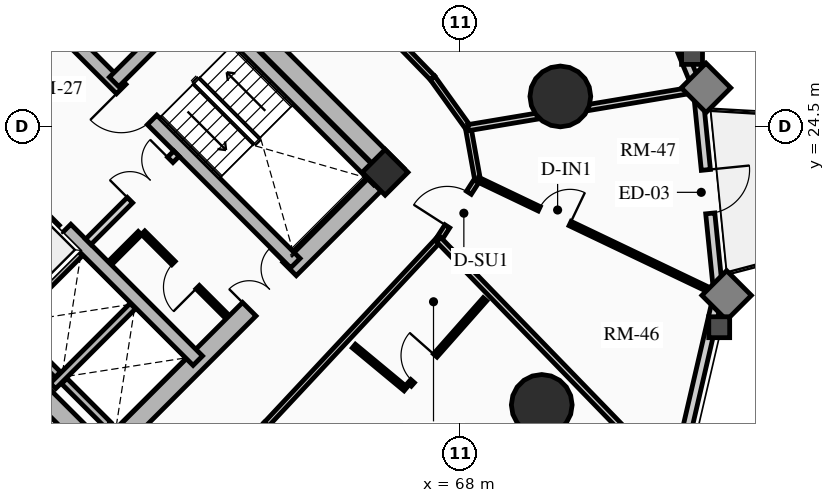
"""IFC4 building model, lengths in metres.
Left out: names, types, materials, properties, quantities, classifications, styles, units other than length and angle.
Written with IfcOpenShell. Run it as: python <this file> out.ifc"""

import sys

from ifc_helpers import new_model, si_unit, direction, frame, frame_2d, origin, origin_2d, place, context, subcontext, project, spatial, rectangle, circle, extrude, source, transform, mapped, element, fill, save


model = new_model("IFC4")
c1 = context("Model", 3, precision=1e-05, world=origin(), true_north=direction((0.0, 1.0)))
c2 = subcontext(c1, "Body", "Model", "MODEL_VIEW")
j1 = project(units=[si_unit("LENGTHUNIT", "METRE"), si_unit("PLANEANGLEUNIT", "RADIAN")], contexts=[c1])
p1 = place(None, origin())
s1 = spatial("IfcSite", under=j1, at=p1, CompositionType="ELEMENT")
p2 = place(p1, origin())
s2 = spatial("IfcBuilding", under=s1, at=p2, CompositionType="ELEMENT")
p3 = place(p2, frame((0.0, 0.0, 30.73)))
s3 = spatial("IfcBuildingStorey", under=s2, at=p3, CompositionType="ELEMENT", Elevation=30.73)
for number, where, z_axis, x_axis in (
    (1, (58.773, 15.661, 0.0), (0.0, 0.0, 1.0), (-0.707, 0.707, 0.0)),
    (2, (66.339, 23.227, 0.0), (0.0, 0.0, 1.0), (-0.707, 0.707, 0.0)),
):
    element("IfcWall", number, at=place(p3, frame(where, z_axis=z_axis, x_axis=x_axis)), inside=s3, PredefinedType="SHEAR", context=c2, shape_type="SweptSolid", body=[
        extrude(rectangle(XDim=14.3, YDim=0.5, at=frame_2d((7.15, 0.0))), origin(), (0.0, 0.0, 1.0), 2.91),
    ])
p4 = place(p3, frame((58.596, 15.838, 0.0), z_axis=(0.0, 0.0, 1.0), x_axis=(0.707106781187, 0.707106781187, 0.0)))
e3 = element("IfcWall", 3, at=p4, inside=s3, PredefinedType="SHEAR", context=c2, shape_type="SweptSolid", body=[
    extrude(rectangle(XDim=10.7, YDim=0.5, at=frame_2d((5.35, 0.0))), origin(), (0.0, 0.0, 1.0), 2.91),
])
m1 = source(origin(), c2, "Body", "SweptSolid", [
    extrude(rectangle(XDim=1.5, YDim=2.02, at=frame_2d((0.75, 1.01))), frame((0.0, 0.26, 0.0), z_axis=(0.0, -1.0, 0.0), x_axis=(1.0, 0.0, 0.0)), (0.0, 0.0, 1.0), 0.52),
])
p5 = place(p4, frame((5.45, 0.0, 0.0)))
e4 = element("IfcOpeningElement", 4, at=p5, cuts=e3, PredefinedType="OPENING", context=c2, shape_type="MappedRepresentation", body=[
    mapped(m1, transform((0.0, 0.0, 0.0), x_axis=(1.0, 0.0, 0.0), y_axis=(0.0, 1.0, 0.0), z_axis=(0.0, 0.0, 1.0), scale=1.0)),
])
p6 = place(p3, frame((61.096, 18.338, 0.0), z_axis=(0.0, 0.0, 1.0), x_axis=(-0.707106781187, 0.707106781187, 0.0)))
e5 = element("IfcWall", 5, at=p6, inside=s3, PredefinedType="SHEAR", context=c2, shape_type="SweptSolid", body=[
    extrude(rectangle(XDim=13.8, YDim=0.35, at=frame_2d((6.9, 0.0))), origin(), (0.0, 0.0, 1.0), 2.91),
])
m2 = source(origin(), c2, "Body", "SweptSolid", [
    extrude(rectangle(XDim=1.1, YDim=2.015, at=frame_2d((0.55, 1.007))), frame((0.0, 0.185, 0.0), z_axis=(0.0, -1.0, 0.0), x_axis=(1.0, 0.0, 0.0)), (0.0, 0.0, 1.0), 0.37),
])
p7 = place(p6, frame((4.9, 0.0, 0.0)))
e6 = element("IfcOpeningElement", 6, at=p7, cuts=e5, PredefinedType="OPENING", context=c2, shape_type="MappedRepresentation", body=[
    mapped(m2, transform((0.0, 0.0, 0.0), x_axis=(1.0, 0.0, 0.0), y_axis=(0.0, 1.0, 0.0), z_axis=(0.0, 0.0, 1.0), scale=1.0)),
])
m3 = source(origin(), c2, "Body", "SweptSolid", [
    extrude(rectangle(XDim=1.15, YDim=2.02, at=frame_2d((0.575, 1.01))), frame((0.0, 0.185, 0.0), z_axis=(0.0, -1.0, 0.0), x_axis=(1.0, 0.0, 0.0)), (0.0, 0.0, 1.0), 0.37),
])
p8 = place(p6, frame((7.32, 0.0, 0.0)))
e7 = element("IfcOpeningElement", 7, at=p8, cuts=e5, PredefinedType="OPENING", context=c2, shape_type="MappedRepresentation", body=[
    mapped(m3, transform((0.0, 0.0, 0.0), x_axis=(1.0, 0.0, 0.0), y_axis=(0.0, 1.0, 0.0), z_axis=(0.0, 0.0, 1.0), scale=1.0)),
])
p9 = place(p3, frame((63.662, 20.904, 0.0), z_axis=(0.0, 0.0, 1.0), x_axis=(-0.707106781187, 0.707106781187, 0.0)))
e8 = element("IfcWall", 8, at=p9, inside=s3, PredefinedType="SHEAR", context=c2, shape_type="SweptSolid", body=[
    extrude(rectangle(XDim=13.8, YDim=0.35, at=frame_2d((6.9, 0.0))), origin(), (0.0, 0.0, 1.0), 2.91),
])
p10 = place(p9, frame((10.025, 0.0, 0.0)))
e9 = element("IfcOpeningElement", 9, at=p10, cuts=e8, PredefinedType="OPENING", context=c2, shape_type="MappedRepresentation", body=[
    mapped(m2, transform((0.0, 0.0, 0.0), x_axis=(1.0, 0.0, 0.0), y_axis=(0.0, 1.0, 0.0), z_axis=(0.0, 0.0, 1.0), scale=1.0)),
])
p11 = place(p9, frame((12.025, 0.0, 0.0)))
e10 = element("IfcOpeningElement", 10, at=p11, cuts=e8, PredefinedType="OPENING", context=c2, shape_type="MappedRepresentation", body=[
    mapped(m2, transform((0.0, 0.0, 0.0), x_axis=(1.0, 0.0, 0.0), y_axis=(0.0, 1.0, 0.0), z_axis=(0.0, 0.0, 1.0), scale=1.0)),
])
p12 = place(p9, frame((5.33, 0.0, 0.0)))
e11 = element("IfcOpeningElement", 11, at=p12, cuts=e8, PredefinedType="OPENING", context=c2, shape_type="MappedRepresentation", body=[
    mapped(m3, transform((0.0, 0.0, 0.0), x_axis=(1.0, 0.0, 0.0), y_axis=(0.0, 1.0, 0.0), z_axis=(0.0, 0.0, 1.0), scale=1.0)),
])
p13 = place(p3, frame((65.847, 23.089, 0.0), z_axis=(0.0, 0.0, 1.0), x_axis=(-0.707106781187, 0.707106781187, 0.0)))
e12 = element("IfcWall", 12, at=p13, inside=s3, PredefinedType="SHEAR", context=c2, shape_type="SweptSolid", body=[
    extrude(rectangle(XDim=6.745, YDim=0.35, at=frame_2d((3.373, 0.0))), origin(), (0.0, 0.0, 1.0), 2.91),
])
p14 = place(p3, frame((58.893, 25.674, 0.0), z_axis=(0.0, 0.0, 1.0), x_axis=(0.707106781187, 0.707106781187, 0.0)))
e13 = element("IfcWall", 13, at=p14, inside=s3, PredefinedType="SHEAR", context=c2, shape_type="SweptSolid", body=[
    extrude(rectangle(XDim=3.285, YDim=0.35, at=frame_2d((1.643, 0.0))), origin(), (0.0, 0.0, 1.0), 2.91),
])
p15 = place(p3, frame((66.024, 23.294, 0.0), z_axis=(0.0, 0.0, 1.0), x_axis=(0.707106781187, 0.707106781187, 0.0)))
e14 = element("IfcColumn", 14, at=p15, inside=s3, PredefinedType="COLUMN", context=c2, shape_type="SweptSolid", body=[
    extrude(rectangle(XDim=0.85, YDim=0.85, at=origin_2d()), origin(), (0.0, 0.0, 1.0), 2.91),
])
for number, where, z_axis, x_axis in (
    (15, (70.146, 17.173, 0.0), (0.0, 0.0, 1.0), (1.0, 0.0, 0.0)),
    (16, (70.635, 25.291, 0.0), (0.0, 0.0, 1.0), (1.0, 0.0, 0.0)),
):
    element("IfcColumn", number, at=place(p3, frame(where, z_axis=z_axis, x_axis=x_axis)), inside=s3, PredefinedType="USERDEFINED", context=c2, shape_type="SweptSolid", body=[
        extrude(circle(Radius=0.8, at=origin_2d()), origin(), (0.0, 0.0, 1.0), 2.91),
    ])
p16 = place(p3, frame((74.794, 20.09, 0.0), z_axis=(0.0, 0.0, 1.0), x_axis=(-0.22582585901, -0.974167686491, 0.0)))
e17 = element("IfcWall", 17, at=p16, inside=s3, PredefinedType="SOLIDWALL", context=c2, shape_type="SweptSolid", body=[
    extrude(rectangle(XDim=5.092, YDim=0.24, at=frame_2d((2.546, 0.0))), origin(), (0.0, 0.0, 1.0), 2.073),
])
p17 = place(p3, frame((74.251, 25.482, 0.0), z_axis=(0.0, 0.0, 1.0), x_axis=(0.100190592135, -0.994968263437, 0.0)))
e18 = element("IfcWall", 18, at=p17, inside=s3, PredefinedType="SOLIDWALL", context=c2, shape_type="SweptSolid", body=[
    extrude(rectangle(XDim=5.419, YDim=0.24, at=frame_2d((2.71, 0.0))), origin(), (0.0, 0.0, 1.0), 2.073),
])
m4 = source(origin(), c2, "Body", "SweptSolid", [
    extrude(rectangle(XDim=1.15, YDim=2.005, at=frame_2d((0.575, 1.002))), frame((0.0, 0.13, 0.0), z_axis=(0.0, -1.0, 0.0), x_axis=(1.0, 0.0, 0.0)), (0.0, 0.0, 1.0), 0.26),
])
p18 = place(p17, frame((2.135, 0.0, 0.0)))
e19 = element("IfcOpeningElement", 19, at=p18, cuts=e18, PredefinedType="OPENING", context=c2, shape_type="MappedRepresentation", body=[
    mapped(m4, transform((0.0, 0.0, 0.0), x_axis=(1.0, 0.0, 0.0), y_axis=(0.0, 1.0, 0.0), z_axis=(0.0, 0.0, 1.0), scale=1.0)),
])
p19 = place(p3, frame((72.068, 30.778, 0.0), z_axis=(0.0, 0.0, 1.0), x_axis=(0.381077764176, -0.924542988536, 0.0)))
e20 = element("IfcWall", 20, at=p19, inside=s3, PredefinedType="SOLIDWALL", context=c2, shape_type="SweptSolid", body=[
    extrude(rectangle(XDim=5.728, YDim=0.24, at=frame_2d((2.864, 0.0))), origin(), (0.0, 0.0, 1.0), 2.073),
])
p20 = place(p3, frame((55.888, 19.069, 0.0), z_axis=(0.0, 0.0, 1.0), x_axis=(0.707106781187, 0.707106781187, 0.0)))
e21 = element("IfcWall", 21, at=p20, inside=s3, PredefinedType="SHEAR", context=c2, shape_type="SweptSolid", body=[
    extrude(rectangle(XDim=2.97, YDim=0.2, at=frame_2d((1.485, 0.0))), origin(), (0.0, 0.0, 1.0), 2.91),
])
p21 = place(p3, frame((57.284, 17.673, 0.0), z_axis=(0.0, 0.0, 1.0), x_axis=(0.707147878904, 0.70706568108, 0.0)))
e22 = element("IfcWall", 22, at=p21, inside=s3, PredefinedType="SHEAR", context=c2, shape_type="SweptSolid", body=[
    extrude(rectangle(XDim=2.97, YDim=0.2, at=frame_2d((1.485, 0.0))), origin(), (0.0, 0.0, 1.0), 2.91),
])
p22 = place(p3, frame((57.412, 17.97, 0.0), z_axis=(0.0, 0.0, 1.0), x_axis=(-0.707106781187, 0.707106781187, 0.0)))
e23 = element("IfcWall", 23, at=p22, inside=s3, PredefinedType="SHEAR", context=c2, shape_type="SweptSolid", body=[
    extrude(rectangle(XDim=1.735, YDim=0.2, at=frame_2d((0.867, 0.0))), origin(), (0.0, 0.0, 1.0), 2.91),
])
p23 = place(p3, frame((58.737, 16.644, 0.0), z_axis=(0.0, 0.0, 1.0), x_axis=(-0.707032117043, 0.707181437447, 0.0)))
e24 = element("IfcWall", 24, at=p23, inside=s3, PredefinedType="SHEAR", context=c2, shape_type="SweptSolid", body=[
    extrude(rectangle(XDim=1.635, YDim=0.2, at=frame_2d((0.817, 0.0))), origin(), (0.0, 0.0, 1.0), 2.91),
])
p24 = place(p3, frame((58.214, 21.467, 0.0), z_axis=(0.0, 0.0, 1.0), x_axis=(0.707106781187, 0.707106781187, 0.0)))
e25 = element("IfcWall", 25, at=p24, inside=s3, PredefinedType="PARTITIONING", context=c2, shape_type="SweptSolid", body=[
    extrude(rectangle(XDim=3.28, YDim=0.2, at=frame_2d((1.64, 0.0))), origin(), (0.0, 0.0, 1.0), 2.635),
])
m5 = source(origin(), c2, "Body", "SweptSolid", [
    extrude(rectangle(XDim=1.5, YDim=2.02, at=frame_2d((0.75, 1.01))), frame((0.0, 0.11, 0.0), z_axis=(0.0, -1.0, 0.0), x_axis=(1.0, 0.0, 0.0)), (0.0, 0.0, 1.0), 0.22),
])
p25 = place(p24, frame((1.55, 0.0, 0.0)))
e26 = element("IfcOpeningElement", 26, at=p25, cuts=e25, PredefinedType="OPENING", context=c2, shape_type="MappedRepresentation", body=[
    mapped(m5, transform((0.0, 0.0, 0.0), x_axis=(1.0, 0.0, 0.0), y_axis=(0.0, 1.0, 0.0), z_axis=(0.0, 0.0, 1.0), scale=1.0)),
])
p26 = place(p3, frame((54.961, 24.719, 0.0), z_axis=(0.0, 0.0, 1.0), x_axis=(0.707106781187, 0.707106781187, 0.0)))
e27 = element("IfcWall", 27, at=p26, inside=s3, PredefinedType="PARTITIONING", context=c2, shape_type="SweptSolid", body=[
    extrude(rectangle(XDim=3.28, YDim=0.2, at=frame_2d((1.64, 0.0))), origin(), (0.0, 0.0, 1.0), 2.635),
])
m6 = source(origin(), c2, "Body", "SweptSolid", [
    extrude(rectangle(XDim=0.9, YDim=2.005, at=frame_2d((0.45, 1.002))), frame((0.0, 0.11, 0.0), z_axis=(0.0, -1.0, 0.0), x_axis=(1.0, 0.0, 0.0)), (0.0, 0.0, 1.0), 0.22),
])
p27 = place(p26, frame((0.16, 0.0, 0.0)))
e28 = element("IfcOpeningElement", 28, at=p27, cuts=e27, PredefinedType="OPENING", context=c2, shape_type="MappedRepresentation", body=[
    mapped(m6, transform((0.0, 0.0, 0.0), x_axis=(1.0, 0.0, 0.0), y_axis=(0.0, 1.0, 0.0), z_axis=(0.0, 0.0, 1.0), scale=1.0)),
])
p28 = place(p3, frame((61.835, 19.529, 0.0), z_axis=(0.0, 0.0, 1.0), x_axis=(-0.707146413884, 0.707067146267, 0.0)))
e29 = element("IfcWall", 29, at=p28, inside=s3, PredefinedType="PARTITIONING", context=c2, shape_type="SweptSolid", body=[
    extrude(rectangle(XDim=3.08, YDim=0.125, at=frame_2d((1.54, 0.0))), origin(), (0.0, 0.0, 1.0), 2.635),
])
m7 = source(origin(), c2, "Body", "SweptSolid", [
    extrude(rectangle(XDim=0.9, YDim=2.005, at=frame_2d((0.45, 1.002))), frame((0.0, 0.073, 0.0), z_axis=(0.0, -1.0, 0.0), x_axis=(1.0, 0.0, 0.0)), (0.0, 0.0, 1.0), 0.145),
])
p29 = place(p28, frame((1.05, 0.0, 0.0)))
e30 = element("IfcOpeningElement", 30, at=p29, cuts=e29, PredefinedType="OPENING", context=c2, shape_type="MappedRepresentation", body=[
    mapped(m7, transform((0.0, 0.0, 0.0), x_axis=(1.0, 0.0, 0.0), y_axis=(0.0, 1.0, 0.0), z_axis=(0.0, 0.0, 1.0), scale=1.0)),
])
p30 = place(p3, frame((58.794, 20.915, 0.0), z_axis=(0.0, 0.0, 1.0), x_axis=(0.707106781187, 0.707106781187, 0.0)))
e31 = element("IfcWall", 31, at=p30, inside=s3, PredefinedType="PARTITIONING", context=c2, shape_type="SweptSolid", body=[
    extrude(rectangle(XDim=1.1, YDim=0.125, at=frame_2d((0.55, 0.0))), origin(), (0.0, 0.0, 1.0), 2.635),
])
p31 = place(p3, frame((62.903, 16.667, 0.0), z_axis=(0.0, 0.0, 1.0), x_axis=(0.682371947497, 0.731005147225, 0.0)))
e32 = element("IfcWall", 32, at=p31, inside=s3, PredefinedType="PARTITIONING", context=c2, shape_type="SweptSolid", body=[
    extrude(rectangle(XDim=6.642, YDim=0.15, at=frame_2d((3.321, 0.0))), origin(), (0.0, 0.0, 1.0), 2.159),
])
p32 = place(p3, frame((67.435, 21.521, 0.0), z_axis=(0.0, 0.0, 1.0), x_axis=(0.540777197838, 0.841165870859, 0.0)))
e33 = element("IfcWall", 33, at=p32, inside=s3, PredefinedType="PARTITIONING", context=c2, shape_type="SweptSolid", body=[
    extrude(rectangle(XDim=1.888, YDim=0.15, at=frame_2d((0.944, 0.0))), origin(), (0.0, 0.0, 1.0), 2.205),
])
m8 = source(origin(), c2, "Body", "SweptSolid", [
    extrude(rectangle(XDim=1.05, YDim=2.015, at=frame_2d((0.525, 1.007))), frame((0.0, 0.085, 0.0), z_axis=(0.0, -1.0, 0.0), x_axis=(1.0, 0.0, 0.0)), (0.0, 0.0, 1.0), 0.17),
])
p33 = place(p32, frame((0.419, 0.0, 0.0)))
e34 = element("IfcOpeningElement", 34, at=p33, cuts=e33, PredefinedType="OPENING", context=c2, shape_type="MappedRepresentation", body=[
    mapped(m8, transform((0.0, 0.0, 0.0), x_axis=(1.0, 0.0, 0.0), y_axis=(0.0, 1.0, 0.0), z_axis=(0.0, 0.0, 1.0), scale=1.0)),
])
p34 = place(p3, frame((68.456, 23.11, 0.0), z_axis=(0.0, 0.0, 1.0), x_axis=(-0.1772522795, 0.984165448191, 0.0)))
e35 = element("IfcWall", 35, at=p34, inside=s3, PredefinedType="PARTITIONING", context=c2, shape_type="SweptSolid", body=[
    extrude(rectangle(XDim=1.382, YDim=0.15, at=frame_2d((0.691, 0.0))), origin(), (0.0, 0.0, 1.0), 2.159),
])
p35 = place(p3, frame((68.211, 24.469, 0.0), z_axis=(0.0, 0.0, 1.0), x_axis=(-0.583012141368, 0.812463441034, 0.0)))
e36 = element("IfcWall", 36, at=p35, inside=s3, PredefinedType="PARTITIONING", context=c2, shape_type="SweptSolid", body=[
    extrude(rectangle(XDim=1.613, YDim=0.15, at=frame_2d((0.807, 0.0))), origin(), (0.0, 0.0, 1.0), 2.205),
])
p36 = place(p3, frame((67.27, 25.78, 0.0), z_axis=(0.0, 0.0, 1.0), x_axis=(-0.696847842907, 0.717218992942, 0.0)))
e37 = element("IfcWall", 37, at=p36, inside=s3, PredefinedType="PARTITIONING", context=c2, shape_type="SweptSolid", body=[
    extrude(rectangle(XDim=6.004, YDim=0.15, at=frame_2d((3.002, 0.0))), origin(), (0.0, 0.0, 1.0), 2.635),
])
m9 = source(origin(), c2, "Body", "SweptSolid", [
    extrude(rectangle(XDim=1.0, YDim=2.015, at=frame_2d((0.5, 1.007))), frame((0.0, 0.085, 0.0), z_axis=(0.0, -1.0, 0.0), x_axis=(1.0, 0.0, 0.0)), (0.0, 0.0, 1.0), 0.17),
])
p37 = place(p36, frame((2.502, 0.0, 0.0)))
e38 = element("IfcOpeningElement", 38, at=p37, cuts=e37, PredefinedType="OPENING", context=c2, shape_type="MappedRepresentation", body=[
    mapped(m9, transform((0.0, 0.0, 0.0), x_axis=(1.0, 0.0, 0.0), y_axis=(0.0, 1.0, 0.0), z_axis=(0.0, 0.0, 1.0), scale=1.0)),
])
p38 = place(p3, frame((67.435, 21.521, 0.0), z_axis=(0.0, 0.0, 1.0), x_axis=(0.6962628802, -0.717786877601, 0.0)))
e39 = element("IfcWall", 39, at=p38, inside=s3, PredefinedType="PARTITIONING", context=c2, shape_type="SweptSolid", body=[
    extrude(rectangle(XDim=8.893, YDim=0.16, at=frame_2d((4.446, 0.0))), origin(), (0.0, 0.0, 1.0), 2.073),
])
p39 = place(p3, frame((68.211, 24.469, 0.0), z_axis=(0.0, 0.0, 1.0), x_axis=(0.986231309699, 0.165371713934, 0.0)))
e40 = element("IfcWall", 40, at=p39, inside=s3, PredefinedType="PARTITIONING", context=c2, shape_type="SweptSolid", body=[
    extrude(rectangle(XDim=6.104, YDim=0.16, at=frame_2d((3.052, 0.0))), origin(), (0.0, 0.0, 1.0), 2.073),
])
p40 = place(p3, frame((65.202, 18.721, 0.0), z_axis=(0.0, 0.0, 1.0), x_axis=(0.769814202386, -0.638268042287, 0.0)))
e41 = element("IfcWall", 41, at=p40, inside=s3, PredefinedType="PARTITIONING", context=c2, shape_type="SweptSolid", body=[
    extrude(rectangle(XDim=1.769, YDim=0.125, at=frame_2d((0.884, 0.0))), origin(), (0.0, 0.0, 1.0), 2.635),
])
p41 = place(p3, frame((66.667, 17.709, 0.0), z_axis=(0.0, 0.0, 1.0), x_axis=(0.662510581678, 0.749052554341, 0.0)))
e42 = element("IfcWall", 42, at=p41, inside=s3, PredefinedType="PARTITIONING", context=c2, shape_type="SweptSolid", body=[
    extrude(rectangle(XDim=2.996, YDim=0.125, at=frame_2d((1.498, 0.0))), origin(), (0.0, 0.0, 1.0), 2.159),
])
p42 = place(p41, frame((0.12, 0.0, 0.0)))
e43 = element("IfcOpeningElement", 43, at=p42, cuts=e42, PredefinedType="OPENING", context=c2, shape_type="MappedRepresentation", body=[
    mapped(m7, transform((0.0, 0.0, 0.0), x_axis=(1.0, 0.0, 0.0), y_axis=(0.0, 1.0, 0.0), z_axis=(0.0, 0.0, 1.0), scale=1.0)),
])
p43 = place(p3, frame((68.456, 23.11, 0.0), z_axis=(0.0, 0.0, 1.0), x_axis=(0.902430819297, -0.430834790125, 0.0)))
e44 = element("IfcWall", 44, at=p43, inside=s3, PredefinedType="PARTITIONING", context=c2, shape_type="SweptSolid", body=[
    extrude(rectangle(XDim=7.002, YDim=0.125, at=frame_2d((3.501, 0.0))), origin(), (0.0, 0.0, 1.0), 2.073),
])
p44 = place(p43, frame((1.8, 0.0, 0.0)))
e45 = element("IfcOpeningElement", 45, at=p44, cuts=e44, PredefinedType="OPENING", context=c2, shape_type="MappedRepresentation", body=[
    mapped(m7, transform((0.0, 0.0, 0.0), x_axis=(1.0, 0.0, 0.0), y_axis=(0.0, 1.0, 0.0), z_axis=(0.0, 0.0, 1.0), scale=1.0)),
])
m10 = source(origin(), c2, "Body", "SweptSolid", [
    extrude(rectangle(XDim=1.15, YDim=2.005, at=frame_2d((0.575, 1.002))), frame((0.0, 0.025, 0.0), z_axis=(0.0, -1.0, 0.0), x_axis=(1.0, 0.0, 0.0)), (0.0, 0.0, 1.0), 0.05),
])
p45 = place(p18, origin())
e46 = element("IfcDoor", 46, at=p45, inside=s3, OperationType="SINGLE_SWING_LEFT", PredefinedType="DOOR", context=c2, shape_type="MappedRepresentation", body=[
    mapped(m10, transform((0.0, 0.0, 0.0), x_axis=(1.0, 0.0, 0.0), y_axis=(0.0, 1.0, 0.0), z_axis=(0.0, 0.0, 1.0), scale=1.0)),
])
fill(e19, e46)
m11 = source(origin(), c2, "Body", "SweptSolid", [
    extrude(rectangle(XDim=1.1, YDim=2.015, at=frame_2d((0.55, 1.007))), frame((0.0, 0.025, 0.0), z_axis=(0.0, -1.0, 0.0), x_axis=(1.0, 0.0, 0.0)), (0.0, 0.0, 1.0), 0.05),
])
p46 = place(p7, origin())
e47 = element("IfcDoor", 47, at=p46, inside=s3, OperationType="SLIDING_TO_RIGHT", PredefinedType="DOOR", context=c2, shape_type="MappedRepresentation", body=[
    mapped(m11, transform((0.0, 0.0, 0.0), x_axis=(1.0, 0.0, 0.0), y_axis=(0.0, 1.0, 0.0), z_axis=(0.0, 0.0, 1.0), scale=1.0)),
])
fill(e6, e47)
m12 = source(origin(), c2, "Body", "SweptSolid", [
    extrude(rectangle(XDim=1.15, YDim=2.02, at=frame_2d((0.575, 1.01))), frame((0.0, 0.025, 0.0), z_axis=(0.0, -1.0, 0.0), x_axis=(1.0, 0.0, 0.0)), (0.0, 0.0, 1.0), 0.05),
])
p47 = place(p12, origin())
e48 = element("IfcDoor", 48, at=p47, inside=s3, OperationType="SINGLE_SWING_RIGHT", PredefinedType="DOOR", context=c2, shape_type="MappedRepresentation", body=[
    mapped(m12, transform((0.0, 0.0, 0.0), x_axis=(1.0, 0.0, 0.0), y_axis=(0.0, 1.0, 0.0), z_axis=(0.0, 0.0, 1.0), scale=1.0)),
])
fill(e11, e48)
m13 = source(origin(), c2, "Body", "SweptSolid", [
    extrude(rectangle(XDim=1.5, YDim=2.02, at=frame_2d((0.75, 1.01))), frame((0.0, 0.025, 0.0), z_axis=(0.0, -1.0, 0.0), x_axis=(1.0, 0.0, 0.0)), (0.0, 0.0, 1.0), 0.05),
])
p48 = place(p5, origin())
e49 = element("IfcDoor", 49, at=p48, inside=s3, OperationType="DOUBLE_DOOR_SINGLE_SWING", PredefinedType="DOOR", context=c2, shape_type="MappedRepresentation", body=[
    mapped(m13, transform((0.0, 0.0, 0.0), x_axis=(1.0, 0.0, 0.0), y_axis=(0.0, 1.0, 0.0), z_axis=(0.0, 0.0, 1.0), scale=1.0)),
])
fill(e4, e49)
p49 = place(p25, origin())
e50 = element("IfcDoor", 50, at=p49, inside=s3, OperationType="DOUBLE_DOOR_SINGLE_SWING", PredefinedType="DOOR", context=c2, shape_type="MappedRepresentation", body=[
    mapped(m13, transform((0.0, 0.0, 0.0), x_axis=(1.0, 0.0, 0.0), y_axis=(0.0, 1.0, 0.0), z_axis=(0.0, 0.0, 1.0), scale=1.0)),
])
fill(e26, e50)
m14 = source(origin(), c2, "Body", "SweptSolid", [
    extrude(rectangle(XDim=0.9, YDim=2.005, at=frame_2d((0.45, 1.002))), frame((0.0, 0.025, 0.0), z_axis=(0.0, -1.0, 0.0), x_axis=(1.0, 0.0, 0.0)), (0.0, 0.0, 1.0), 0.05),
])
p50 = place(p29, origin())
e51 = element("IfcDoor", 51, at=p50, inside=s3, OperationType="SINGLE_SWING_LEFT", PredefinedType="DOOR", context=c2, shape_type="MappedRepresentation", body=[
    mapped(m14, transform((0.0, 0.0, 0.0), x_axis=(1.0, 0.0, 0.0), y_axis=(0.0, 1.0, 0.0), z_axis=(0.0, 0.0, 1.0), scale=1.0)),
])
fill(e30, e51)
p51 = place(p42, origin())
e52 = element("IfcDoor", 52, at=p51, inside=s3, OperationType="SINGLE_SWING_RIGHT", PredefinedType="DOOR", context=c2, shape_type="MappedRepresentation", body=[
    mapped(m14, transform((0.0, 0.0, 0.0), x_axis=(1.0, 0.0, 0.0), y_axis=(0.0, 1.0, 0.0), z_axis=(0.0, 0.0, 1.0), scale=1.0)),
])
fill(e43, e52)
m15 = source(origin(), c2, "Body", "SweptSolid", [
    extrude(rectangle(XDim=1.05, YDim=2.015, at=frame_2d((0.525, 1.007))), frame((0.0, 0.025, 0.0), z_axis=(0.0, -1.0, 0.0), x_axis=(1.0, 0.0, 0.0)), (0.0, 0.0, 1.0), 0.05),
])
p52 = place(p33, origin())
e53 = element("IfcDoor", 53, at=p52, inside=s3, OperationType="SINGLE_SWING_LEFT", PredefinedType="DOOR", context=c2, shape_type="MappedRepresentation", body=[
    mapped(m15, transform((0.0, 0.0, 0.0), x_axis=(1.0, 0.0, 0.0), y_axis=(0.0, 1.0, 0.0), z_axis=(0.0, 0.0, 1.0), scale=1.0)),
])
fill(e34, e53)
p53 = place(p44, origin())
e54 = element("IfcDoor", 54, at=p53, inside=s3, OperationType="SINGLE_SWING_RIGHT", PredefinedType="DOOR", context=c2, shape_type="MappedRepresentation", body=[
    mapped(m14, transform((0.0, 0.0, 0.0), x_axis=(1.0, 0.0, 0.0), y_axis=(0.0, 1.0, 0.0), z_axis=(0.0, 0.0, 1.0), scale=1.0)),
])
fill(e45, e54)
save(model, sys.argv[1])
